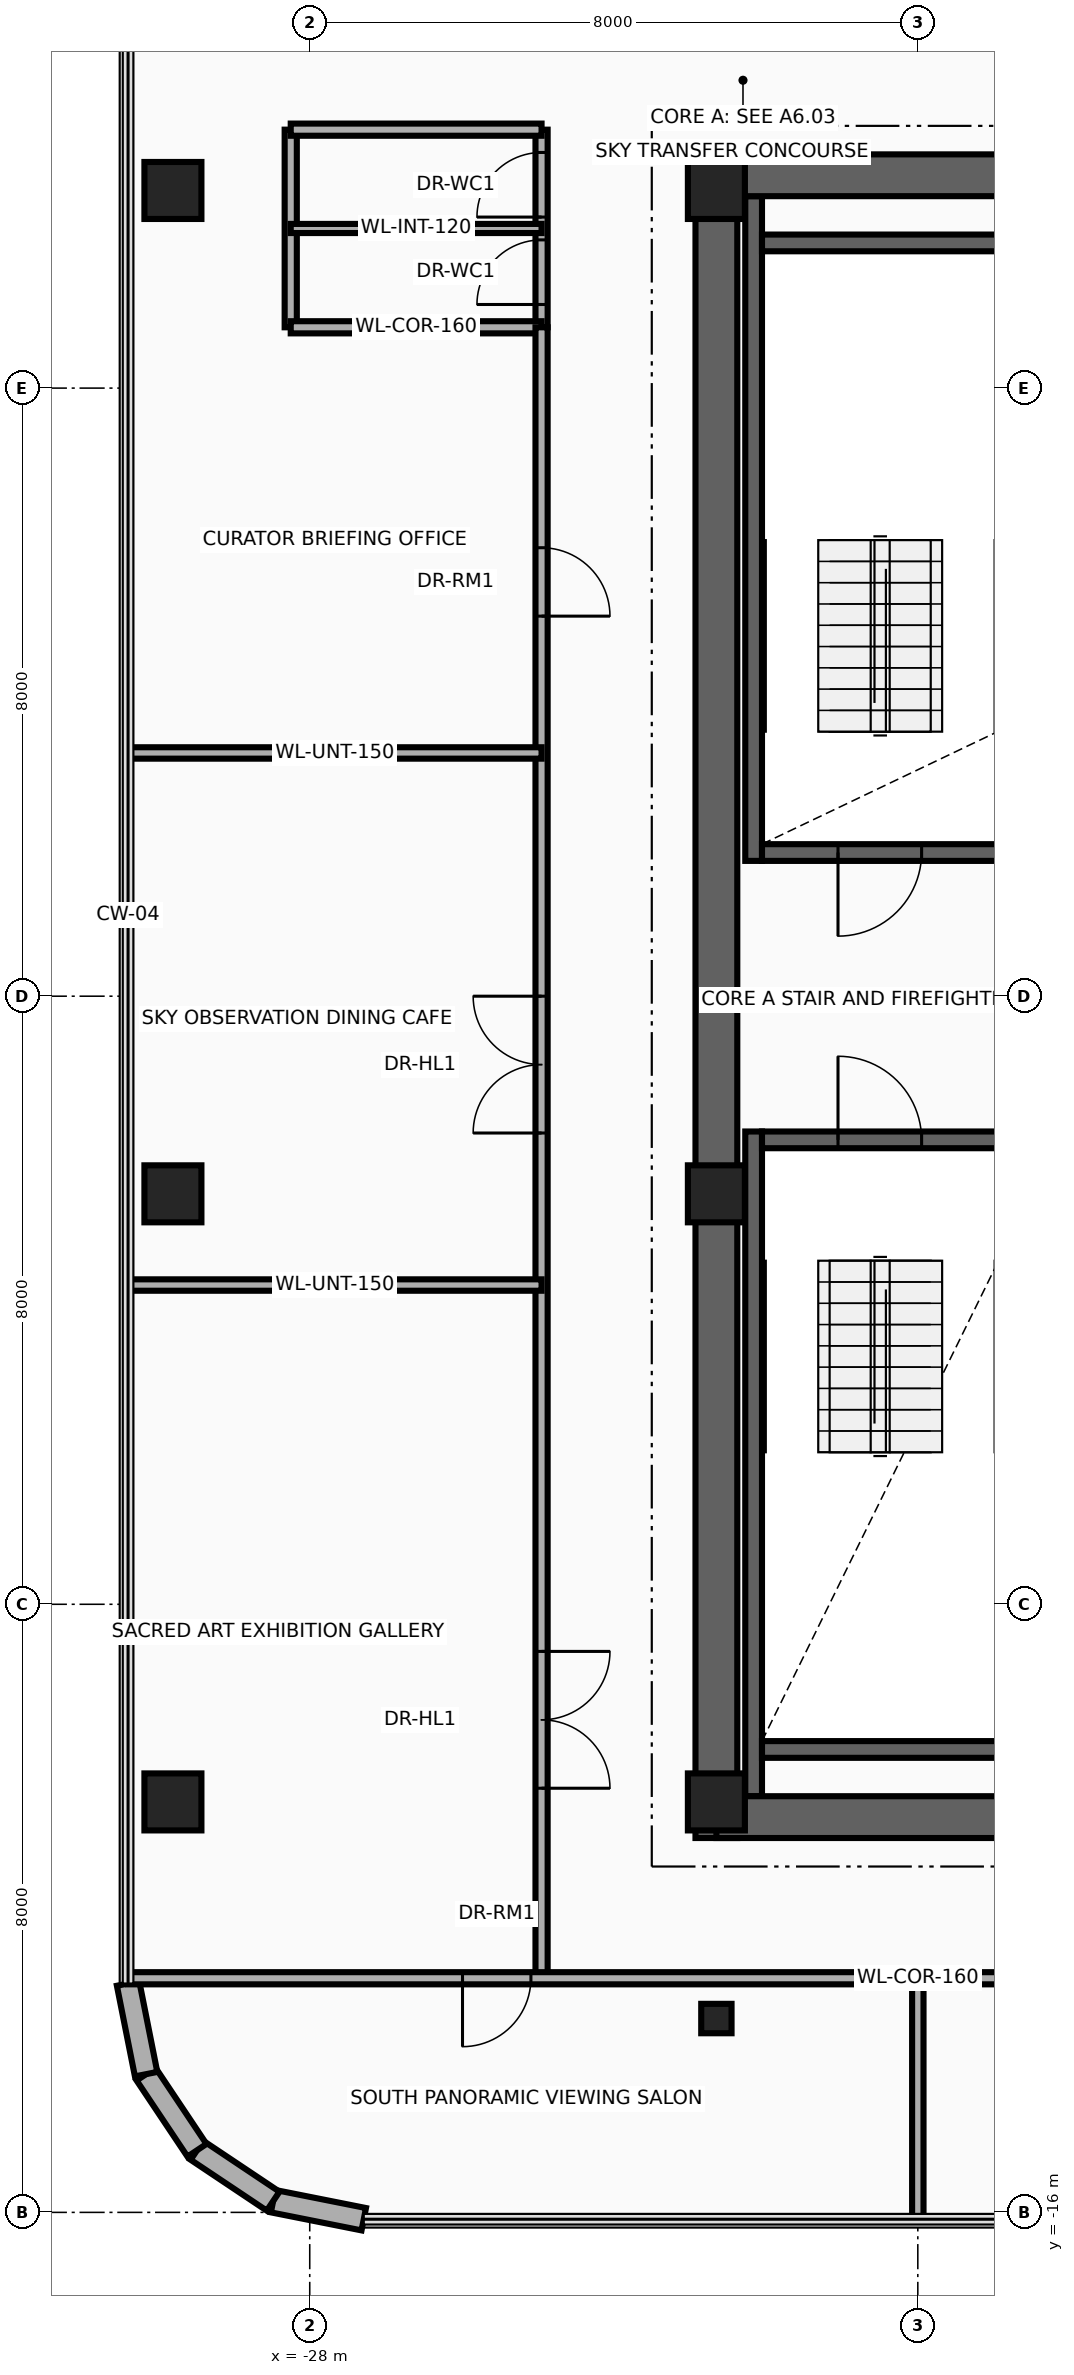
"""IFC4 building model, lengths in metres.
Left out: names, types, materials, properties, quantities, classifications, styles, units other than length and angle.
Written with IfcOpenShell. Run it as: python <this file> out.ifc"""

import sys

from ifc_helpers import new_model, si_unit, direction, frame, frame_2d, origin, origin_2d, place, context, subcontext, project, spatial, rectangle, i_section, extrude, source, transform, mapped, element, fill, save


model = new_model("IFC4")
c1 = context("Model", 3, precision=1e-05, world=origin(), true_north=direction((0.0, 1.0)))
c2 = subcontext(c1, "Body", "Model", "MODEL_VIEW")
j1 = project(units=[si_unit("LENGTHUNIT", "METRE"), si_unit("PLANEANGLEUNIT", "RADIAN")], contexts=[c1])
p1 = place(None, origin())
s1 = spatial("IfcSite", under=j1, at=p1, CompositionType="ELEMENT")
p2 = place(p1, origin())
s2 = spatial("IfcBuilding", under=s1, at=p2, CompositionType="ELEMENT")
p3 = place(p2, frame((0.0, 0.0, 287.0)))
s3 = spatial("IfcBuildingStorey", under=s2, at=p3, CompositionType="ELEMENT", Elevation=287.0)
p4 = place(p3, frame((-22.16, 1.78, 0.0), z_axis=(0.0, 0.0, 1.0), x_axis=(0.0, 1.0, 0.0)))
e1 = element("IfcWall", 1, at=p4, inside=s3, PredefinedType="SHEAR", context=c2, shape_type="SweptSolid", body=[
    extrude(rectangle(XDim=8.745, YDim=0.22, at=frame_2d((4.373, 0.0))), origin(), (0.0, 0.0, 1.0), 3.36),
])
p5 = place(p3, frame((-22.05, 1.89, 0.0), z_axis=(0.0, 0.0, 1.0), x_axis=(1.0, 0.0, 0.0)))
e2 = element("IfcWall", 2, at=p5, inside=s3, PredefinedType="SHEAR", context=c2, shape_type="SweptSolid", body=[
    extrude(rectangle(XDim=3.11, YDim=0.22, at=frame_2d((1.555, 0.0))), origin(), (0.0, 0.0, 1.0), 3.36),
])
p6 = place(p5, frame((1.0, 0.0, 0.0)))
e3 = element("IfcOpeningElement", 3, at=p6, cuts=e2, PredefinedType="OPENING", context=c2, shape_type="SweptSolid", body=[
    extrude(rectangle(XDim=1.1, YDim=2.15, at=frame_2d((0.55, 1.075))), frame((0.0, 0.125, 0.0), z_axis=(0.0, -1.0, 0.0), x_axis=(1.0, 0.0, 0.0)), (0.0, 0.0, 1.0), 0.25),
])
p7 = place(p3, frame((-22.05, 9.91, 0.0), z_axis=(0.0, 0.0, 1.0), x_axis=(1.0, 0.0, 0.0)))
e4 = element("IfcWall", 4, at=p7, inside=s3, PredefinedType="SHEAR", context=c2, shape_type="SweptSolid", body=[
    extrude(rectangle(XDim=3.11, YDim=0.22, at=frame_2d((1.555, 0.0))), origin(), (0.0, 0.0, 1.0), 3.36),
])
p8 = place(p3, frame((-22.16, -10.525, 0.0), z_axis=(0.0, 0.0, 1.0), x_axis=(0.0, 1.0, 0.0)))
e5 = element("IfcWall", 5, at=p8, inside=s3, PredefinedType="SHEAR", context=c2, shape_type="SweptSolid", body=[
    extrude(rectangle(XDim=8.745, YDim=0.22, at=frame_2d((4.373, 0.0))), origin(), (0.0, 0.0, 1.0), 3.36),
])
p9 = place(p3, frame((-22.05, -9.91, 0.0), z_axis=(0.0, 0.0, 1.0), x_axis=(1.0, 0.0, 0.0)))
e6 = element("IfcWall", 6, at=p9, inside=s3, PredefinedType="SHEAR", context=c2, shape_type="SweptSolid", body=[
    extrude(rectangle(XDim=3.11, YDim=0.22, at=frame_2d((1.555, 0.0))), origin(), (0.0, 0.0, 1.0), 3.36),
])
p10 = place(p3, frame((-22.05, -1.89, 0.0), z_axis=(0.0, 0.0, 1.0), x_axis=(1.0, 0.0, 0.0)))
e7 = element("IfcWall", 7, at=p10, inside=s3, PredefinedType="SHEAR", context=c2, shape_type="SweptSolid", body=[
    extrude(rectangle(XDim=3.11, YDim=0.22, at=frame_2d((1.555, 0.0))), origin(), (0.0, 0.0, 1.0), 3.36),
])
p11 = place(p10, frame((1.0, 0.0, 0.0)))
e8 = element("IfcOpeningElement", 8, at=p11, cuts=e7, PredefinedType="OPENING", context=c2, shape_type="SweptSolid", body=[
    extrude(rectangle(XDim=1.1, YDim=2.15, at=frame_2d((0.55, 1.075))), frame((0.0, 0.125, 0.0), z_axis=(0.0, -1.0, 0.0), x_axis=(1.0, 0.0, 0.0)), (0.0, 0.0, 1.0), 0.25),
])
p12 = place(p3, frame((-22.65, -11.075, 0.0), z_axis=(0.0, 0.0, 1.0), x_axis=(0.0, 1.0, 0.0)))
e9 = element("IfcWall", 9, at=p12, inside=s3, PredefinedType="SHEAR", context=c2, shape_type="SweptSolid", body=[
    extrude(rectangle(XDim=22.15, YDim=0.55, at=frame_2d((11.075, 0.0))), origin(), (0.0, 0.0, 1.0), 3.36),
])
for number, where, z_axis, x_axis in (
    (10, (-22.65, 10.8, 0.0), (0.0, 0.0, 1.0), (1.0, 0.0, 0.0)),
    (11, (-22.65, -10.8, 0.0), (0.0, 0.0, 1.0), (1.0, 0.0, 0.0)),
):
    element("IfcWall", number, at=place(p3, frame(where, z_axis=z_axis, x_axis=x_axis)), inside=s3, PredefinedType="SHEAR", context=c2, shape_type="SweptSolid", body=[
        extrude(rectangle(XDim=10.25, YDim=0.55, at=frame_2d((5.125, 0.0))), origin(), (0.0, 0.0, 1.0), 3.36),
    ])
m1 = source(origin(), c2, "Body", "SweptSolid", [
    extrude(rectangle(XDim=0.75, YDim=0.75, at=origin_2d()), origin(), (0.0, 0.0, 1.0), 3.6),
])
for number, where, z_axis, x_axis in (
    (12, (-29.8, -10.6, 0.0), (0.0, 0.0, 1.0), (1.0, 0.0, 0.0)),
    (13, (-22.65, -10.6, 0.0), (0.0, 0.0, 1.0), (1.0, 0.0, 0.0)),
    (14, (-29.8, -2.6, 0.0), (0.0, 0.0, 1.0), (1.0, 0.0, 0.0)),
    (15, (-22.65, -2.6, 0.0), (0.0, 0.0, 1.0), (1.0, 0.0, 0.0)),
    (16, (-29.8, 10.6, 0.0), (0.0, 0.0, 1.0), (1.0, 0.0, 0.0)),
    (17, (-22.65, 10.6, 0.0), (0.0, 0.0, 1.0), (1.0, 0.0, 0.0)),
):
    element("IfcColumn", number, at=place(p3, frame(where, z_axis=z_axis, x_axis=x_axis)), inside=s3, PredefinedType="COLUMN", context=c2, shape_type="MappedRepresentation", body=[
        mapped(m1, transform((0.0, 0.0, 0.0), x_axis=(1.0, 0.0, 0.0), y_axis=(0.0, 1.0, 0.0), z_axis=(0.0, 0.0, 1.0), scale=1.0)),
    ])
m2 = source(origin(), c2, "Body", "SweptSolid", [
    extrude(i_section(OverallWidth=0.399, OverallDepth=0.387, WebThickness=0.021, FlangeThickness=0.033, at=origin_2d()), origin(), (0.0, 0.0, 1.0), 3.6),
])
p13 = place(p3, frame((-22.65, -13.45, 0.0), z_axis=(0.0, 0.0, 1.0), x_axis=(1.0, 0.0, 0.0)))
e18 = element("IfcColumn", 18, at=p13, inside=s3, PredefinedType="PILASTER", context=c2, shape_type="MappedRepresentation", body=[
    mapped(m2, transform((0.0, 0.0, 0.0), x_axis=(1.0, 0.0, 0.0), y_axis=(0.0, 1.0, 0.0), z_axis=(0.0, 0.0, 1.0), scale=1.0)),
])
p14 = place(p3, frame((-27.289, -16.09, 0.0), z_axis=(0.0, 0.0, 1.0), x_axis=(-0.980765602568, 0.195189223115, 0.0)))
e19 = element("IfcWall", 19, at=p14, inside=s3, PredefinedType="SOLIDWALL", context=c2, shape_type="SweptSolid", body=[
    extrude(rectangle(XDim=1.216, YDim=0.3, at=frame_2d((0.608, 0.0))), origin(), (0.0, 0.0, 1.0), 3.36),
])
for number, where, z_axis, x_axis in (
    (20, (-28.482, -15.853, 0.0), (0.0, 0.0, 1.0), (-0.831, 0.556, 0.0)),
    (21, (-29.483, -15.183, 0.0), (0.0, 0.0, 1.0), (-0.556, 0.831, 0.0)),
):
    element("IfcWall", number, at=place(p3, frame(where, z_axis=z_axis, x_axis=x_axis)), inside=s3, PredefinedType="SOLIDWALL", context=c2, shape_type="SweptSolid", body=[
        extrude(rectangle(XDim=1.205, YDim=0.3, at=frame_2d((0.603, 0.0))), origin(), (0.0, 0.0, 1.0), 3.36),
    ])
p15 = place(p3, frame((-30.153, -14.182, 0.0), z_axis=(0.0, 0.0, 1.0), x_axis=(-0.194996050505, 0.980804027463, 0.0)))
e22 = element("IfcWall", 22, at=p15, inside=s3, PredefinedType="SOLIDWALL", context=c2, shape_type="SweptSolid", body=[
    extrude(rectangle(XDim=1.216, YDim=0.3, at=frame_2d((0.608, 0.0))), origin(), (0.0, 0.0, 1.0), 3.36),
])
p16 = place(p3, frame((-28.25, 8.8, 0.0), z_axis=(0.0, 0.0, 1.0), x_axis=(0.0, 1.0, 0.0)))
e23 = element("IfcWall", 23, at=p16, inside=s3, PredefinedType="PARTITIONING", context=c2, shape_type="SweptSolid", body=[
    extrude(rectangle(XDim=2.6, YDim=0.16, at=frame_2d((1.3, 0.0))), origin(), (0.0, 0.0, 1.0), 2.723),
])
p17 = place(p3, frame((-24.95, 8.8, 0.0), z_axis=(0.0, 0.0, 1.0), x_axis=(0.0, 1.0, 0.0)))
e24 = element("IfcWall", 24, at=p17, inside=s3, PredefinedType="PARTITIONING", context=c2, shape_type="SweptSolid", body=[
    extrude(rectangle(XDim=2.6, YDim=0.16, at=frame_2d((1.3, 0.0))), origin(), (0.0, 0.0, 1.0), 2.723),
])
p18 = place(p17, frame((0.3, 0.0, 0.0)))
e25 = element("IfcOpeningElement", 25, at=p18, cuts=e24, PredefinedType="OPENING", context=c2, shape_type="SweptSolid", body=[
    extrude(rectangle(XDim=0.85, YDim=2.1, at=frame_2d((0.425, 1.05))), frame((0.0, 0.095, 0.0), z_axis=(0.0, -1.0, 0.0), x_axis=(1.0, 0.0, 0.0)), (0.0, 0.0, 1.0), 0.19),
])
p19 = place(p17, frame((1.45, 0.0, 0.0)))
e26 = element("IfcOpeningElement", 26, at=p19, cuts=e24, PredefinedType="OPENING", context=c2, shape_type="SweptSolid", body=[
    extrude(rectangle(XDim=0.85, YDim=2.1, at=frame_2d((0.425, 1.05))), frame((0.0, 0.095, 0.0), z_axis=(0.0, -1.0, 0.0), x_axis=(1.0, 0.0, 0.0)), (0.0, 0.0, 1.0), 0.19),
])
for number, where, z_axis, x_axis in (
    (27, (-28.25, 8.8, 0.0), (0.0, 0.0, 1.0), (1.0, 0.0, 0.0)),
    (28, (-28.25, 11.4, 0.0), (0.0, 0.0, 1.0), (1.0, 0.0, 0.0)),
):
    element("IfcWall", number, at=place(p3, frame(where, z_axis=z_axis, x_axis=x_axis)), inside=s3, PredefinedType="PARTITIONING", context=c2, shape_type="SweptSolid", body=[
        extrude(rectangle(XDim=3.3, YDim=0.16, at=frame_2d((1.65, 0.0))), origin(), (0.0, 0.0, 1.0), 3.36),
    ])
p20 = place(p3, frame((-28.25, 10.1, 0.0), z_axis=(0.0, 0.0, 1.0), x_axis=(1.0, 0.0, 0.0)))
e29 = element("IfcWall", 29, at=p20, inside=s3, PredefinedType="PARTITIONING", context=c2, shape_type="SweptSolid", body=[
    extrude(rectangle(XDim=3.3, YDim=0.12, at=frame_2d((1.65, 0.0))), origin(), (0.0, 0.0, 1.0), 3.36),
])
p21 = place(p3, frame((-24.95, -12.92, 0.0), z_axis=(0.0, 0.0, 1.0), x_axis=(0.0, 1.0, 0.0)))
e30 = element("IfcWall", 30, at=p21, inside=s3, PredefinedType="PARTITIONING", context=c2, shape_type="SweptSolid", body=[
    extrude(rectangle(XDim=21.72, YDim=0.16, at=frame_2d((10.86, 0.0))), origin(), (0.0, 0.0, 1.0), 2.723),
])
p22 = place(p21, frame((2.5, 0.0, 0.0)))
e31 = element("IfcOpeningElement", 31, at=p22, cuts=e30, PredefinedType="OPENING", context=c2, shape_type="SweptSolid", body=[
    extrude(rectangle(XDim=1.8, YDim=2.15, at=frame_2d((0.9, 1.075))), frame((0.0, 0.095, 0.0), z_axis=(0.0, -1.0, 0.0), x_axis=(1.0, 0.0, 0.0)), (0.0, 0.0, 1.0), 0.19),
])
p23 = place(p21, frame((11.12, 0.0, 0.0)))
e32 = element("IfcOpeningElement", 32, at=p23, cuts=e30, PredefinedType="OPENING", context=c2, shape_type="SweptSolid", body=[
    extrude(rectangle(XDim=1.8, YDim=2.15, at=frame_2d((0.9, 1.075))), frame((0.0, 0.095, 0.0), z_axis=(0.0, -1.0, 0.0), x_axis=(1.0, 0.0, 0.0)), (0.0, 0.0, 1.0), 0.19),
])
p24 = place(p21, frame((17.92, 0.0, 0.0)))
e33 = element("IfcOpeningElement", 33, at=p24, cuts=e30, PredefinedType="OPENING", context=c2, shape_type="SweptSolid", body=[
    extrude(rectangle(XDim=0.9, YDim=2.1, at=frame_2d((0.45, 1.05))), frame((0.0, 0.095, 0.0), z_axis=(0.0, -1.0, 0.0), x_axis=(1.0, 0.0, 0.0)), (0.0, 0.0, 1.0), 0.19),
])
for number, where, z_axis, x_axis in (
    (34, (-30.39, -3.8, 0.0), (0.0, 0.0, 1.0), (1.0, 0.0, 0.0)),
    (35, (-30.39, 3.2, 0.0), (0.0, 0.0, 1.0), (1.0, 0.0, 0.0)),
):
    element("IfcWall", number, at=place(p3, frame(where, z_axis=z_axis, x_axis=x_axis)), inside=s3, PredefinedType="PARTITIONING", context=c2, shape_type="SweptSolid", body=[
        extrude(rectangle(XDim=5.44, YDim=0.15, at=frame_2d((2.72, 0.0))), origin(), (0.0, 0.0, 1.0), 2.806),
    ])
p25 = place(p3, frame((-30.39, -12.92, 0.0), z_axis=(0.0, 0.0, 1.0), x_axis=(1.0, 0.0, 0.0)))
e36 = element("IfcWall", 36, at=p25, inside=s3, PredefinedType="PARTITIONING", context=c2, shape_type="SweptSolid", body=[
    extrude(rectangle(XDim=20.78, YDim=0.16, at=frame_2d((10.39, 0.0))), origin(), (0.0, 0.0, 1.0), 2.734),
])
p26 = place(p25, frame((4.4, 0.0, 0.0)))
e37 = element("IfcOpeningElement", 37, at=p26, cuts=e36, PredefinedType="OPENING", context=c2, shape_type="SweptSolid", body=[
    extrude(rectangle(XDim=0.9, YDim=2.1, at=frame_2d((0.45, 1.05))), frame((0.0, 0.095, 0.0), z_axis=(0.0, -1.0, 0.0), x_axis=(1.0, 0.0, 0.0)), (0.0, 0.0, 1.0), 0.19),
])
p27 = place(p25, frame((14.5, 0.0, 0.0)))
e38 = element("IfcOpeningElement", 38, at=p27, cuts=e36, PredefinedType="OPENING", context=c2, shape_type="SweptSolid", body=[
    extrude(rectangle(XDim=0.9, YDim=2.1, at=frame_2d((0.45, 1.05))), frame((0.0, 0.095, 0.0), z_axis=(0.0, -1.0, 0.0), x_axis=(1.0, 0.0, 0.0)), (0.0, 0.0, 1.0), 0.19),
])
p28 = place(p3, frame((-20.0, -16.09, 0.0), z_axis=(0.0, 0.0, 1.0), x_axis=(0.0, 1.0, 0.0)))
e39 = element("IfcWall", 39, at=p28, inside=s3, PredefinedType="PARTITIONING", context=c2, shape_type="SweptSolid", body=[
    extrude(rectangle(XDim=3.17, YDim=0.15, at=frame_2d((1.585, 0.0))), origin(), (0.0, 0.0, 1.0), 2.806),
])
p29 = place(p6, frame((1.1, 0.0, 0.0), z_axis=(0.0, 0.0, 1.0), x_axis=(-1.0, 0.0, 0.0)))
e40 = element("IfcDoor", 40, at=p29, inside=s3, OperationType="SINGLE_SWING_LEFT", PredefinedType="DOOR", context=c2, shape_type="SweptSolid", body=[
    extrude(rectangle(XDim=1.1, YDim=2.15, at=frame_2d((0.55, 1.075))), frame((0.0, 0.025, 0.0), z_axis=(0.0, -1.0, 0.0), x_axis=(1.0, 0.0, 0.0)), (0.0, 0.0, 1.0), 0.05),
])
fill(e3, e40)
p30 = place(p11, origin())
e41 = element("IfcDoor", 41, at=p30, inside=s3, OperationType="SINGLE_SWING_RIGHT", PredefinedType="DOOR", context=c2, shape_type="SweptSolid", body=[
    extrude(rectangle(XDim=1.1, YDim=2.15, at=frame_2d((0.55, 1.075))), frame((0.0, 0.025, 0.0), z_axis=(0.0, -1.0, 0.0), x_axis=(1.0, 0.0, 0.0)), (0.0, 0.0, 1.0), 0.05),
])
fill(e8, e41)
p31 = place(p18, origin())
e42 = element("IfcDoor", 42, at=p31, inside=s3, OperationType="SINGLE_SWING_LEFT", PredefinedType="DOOR", context=c2, shape_type="SweptSolid", body=[
    extrude(rectangle(XDim=0.85, YDim=2.1, at=frame_2d((0.425, 1.05))), frame((0.0, 0.025, 0.0), z_axis=(0.0, -1.0, 0.0), x_axis=(1.0, 0.0, 0.0)), (0.0, 0.0, 1.0), 0.05),
])
fill(e25, e42)
p32 = place(p19, origin())
e43 = element("IfcDoor", 43, at=p32, inside=s3, OperationType="SINGLE_SWING_RIGHT", PredefinedType="DOOR", context=c2, shape_type="SweptSolid", body=[
    extrude(rectangle(XDim=0.85, YDim=2.1, at=frame_2d((0.425, 1.05))), frame((0.0, 0.025, 0.0), z_axis=(0.0, -1.0, 0.0), x_axis=(1.0, 0.0, 0.0)), (0.0, 0.0, 1.0), 0.05),
])
fill(e26, e43)
p33 = place(p22, frame((1.8, 0.0, 0.0), z_axis=(0.0, 0.0, 1.0), x_axis=(-1.0, 0.0, 0.0)))
e44 = element("IfcDoor", 44, at=p33, inside=s3, OperationType="DOUBLE_DOOR_SINGLE_SWING", PredefinedType="DOOR", context=c2, shape_type="SweptSolid", body=[
    extrude(rectangle(XDim=1.8, YDim=2.15, at=frame_2d((0.9, 1.075))), frame((0.0, 0.025, 0.0), z_axis=(0.0, -1.0, 0.0), x_axis=(1.0, 0.0, 0.0)), (0.0, 0.0, 1.0), 0.05),
])
fill(e31, e44)
p34 = place(p23, origin())
e45 = element("IfcDoor", 45, at=p34, inside=s3, OperationType="DOUBLE_DOOR_SINGLE_SWING", PredefinedType="DOOR", context=c2, shape_type="SweptSolid", body=[
    extrude(rectangle(XDim=1.8, YDim=2.15, at=frame_2d((0.9, 1.075))), frame((0.0, 0.025, 0.0), z_axis=(0.0, -1.0, 0.0), x_axis=(1.0, 0.0, 0.0)), (0.0, 0.0, 1.0), 0.05),
])
fill(e32, e45)
p35 = place(p24, frame((0.9, 0.0, 0.0), z_axis=(0.0, 0.0, 1.0), x_axis=(-1.0, 0.0, 0.0)))
e46 = element("IfcDoor", 46, at=p35, inside=s3, OperationType="SINGLE_SWING_LEFT", PredefinedType="DOOR", context=c2, shape_type="SweptSolid", body=[
    extrude(rectangle(XDim=0.9, YDim=2.1, at=frame_2d((0.45, 1.05))), frame((0.0, 0.025, 0.0), z_axis=(0.0, -1.0, 0.0), x_axis=(1.0, 0.0, 0.0)), (0.0, 0.0, 1.0), 0.05),
])
fill(e33, e46)
p36 = place(p26, frame((0.9, 0.0, 0.0), z_axis=(0.0, 0.0, 1.0), x_axis=(-1.0, 0.0, 0.0)))
e47 = element("IfcDoor", 47, at=p36, inside=s3, OperationType="SINGLE_SWING_LEFT", PredefinedType="DOOR", context=c2, shape_type="SweptSolid", body=[
    extrude(rectangle(XDim=0.9, YDim=2.1, at=frame_2d((0.45, 1.05))), frame((0.0, 0.025, 0.0), z_axis=(0.0, -1.0, 0.0), x_axis=(1.0, 0.0, 0.0)), (0.0, 0.0, 1.0), 0.05),
])
fill(e37, e47)
save(model, sys.argv[1])
